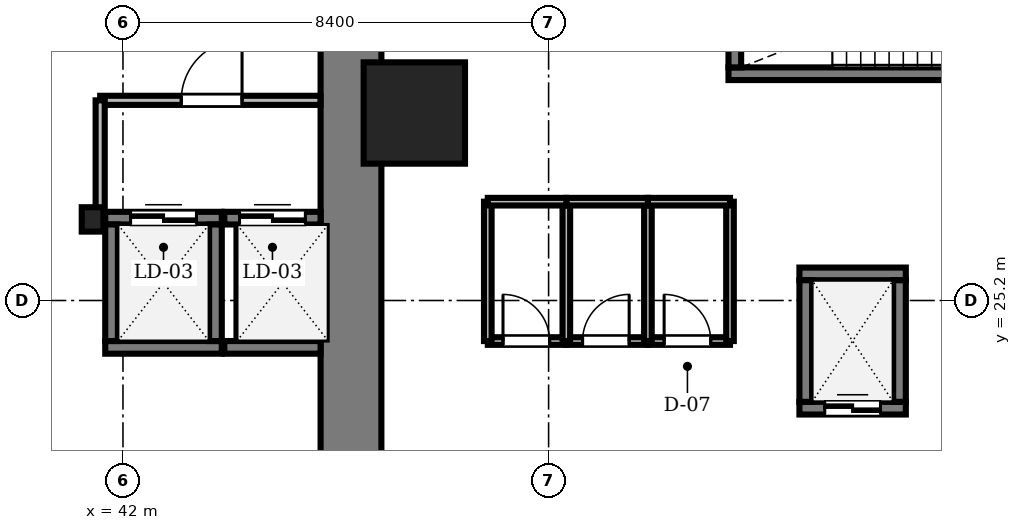
"""IFC4 building model, lengths in metres.
Left out: names, types, materials, properties, quantities, classifications, styles, units other than length and angle.
Written with IfcOpenShell. Run it as: python <this file> out.ifc"""

import sys

from ifc_helpers import new_model, si_unit, direction, frame, frame_2d, origin, origin_2d, place, context, subcontext, project, spatial, rectangle, i_section, extrude, source, transform, mapped, element, fill, save


model = new_model("IFC4")
c1 = context("Model", 3, precision=1e-05, world=origin(), true_north=direction((0.0, 1.0)))
c2 = subcontext(c1, "Body", "Model", "MODEL_VIEW")
j1 = project(units=[si_unit("LENGTHUNIT", "METRE"), si_unit("PLANEANGLEUNIT", "RADIAN")], contexts=[c1])
p1 = place(None, origin())
s1 = spatial("IfcSite", under=j1, at=p1, CompositionType="ELEMENT")
p2 = place(p1, origin())
s2 = spatial("IfcBuilding", under=s1, at=p2, CompositionType="ELEMENT")
p3 = place(p2, origin())
s3 = spatial("IfcBuildingStorey", under=s2, at=p3, CompositionType="ELEMENT", Elevation=0.0)
m1 = source(origin(), c2, "Body", "SweptSolid", [
    extrude(rectangle(XDim=13.15, YDim=1.2, at=frame_2d((6.575, 0.0))), origin(), (0.0, 0.0, 1.0), 5.68),
])
p4 = place(p3, frame((46.5, 17.5, 0.0), z_axis=(0.0, 0.0, 1.0), x_axis=(0.0, 1.0, 0.0)))
e1 = element("IfcWall", 1, at=p4, inside=s3, PredefinedType="SHEAR", context=c2, shape_type="MappedRepresentation", body=[
    mapped(m1, transform((0.0, 0.0, 0.0), scale=1.0)),
])
m2 = source(origin(), c2, "Body", "SweptSolid", [
    extrude(i_section(OverallWidth=0.428, OverallDepth=0.481, WebThickness=0.04, FlangeThickness=0.063, FilletRadius=0.015, at=origin_2d()), origin(), (0.0, 0.0, 1.0), 5.68),
])
p5 = place(p3, frame((41.4, 26.8, 0.0), z_axis=(0.0, 0.0, 1.0), x_axis=(1.0, 0.0, 0.0)))
e2 = element("IfcColumn", 2, at=p5, inside=s3, PredefinedType="COLUMN", context=c2, shape_type="MappedRepresentation", body=[
    mapped(m2, transform((0.0, 0.0, 0.0), scale=1.0)),
])
m3 = source(origin(), c2, "Body", "SweptSolid", [
    extrude(rectangle(XDim=2.0, YDim=2.0, at=origin_2d()), origin(), (0.0, 0.0, 1.0), 5.68),
])
p6 = place(p3, frame((47.75, 28.9, 0.0), z_axis=(0.0, 0.0, 1.0), x_axis=(1.0, 0.0, 0.0)))
e3 = element("IfcColumn", 3, at=p6, inside=s3, PredefinedType="COLUMN", context=c2, shape_type="MappedRepresentation", body=[
    mapped(m3, transform((0.0, 0.0, 0.0), scale=1.0)),
])
m4 = source(origin(), c2, "Body", "SweptSolid", [
    extrude(rectangle(XDim=9.9, YDim=0.25, at=frame_2d((4.95, 0.0))), origin(), (0.0, 0.0, 1.0), 5.8),
])
p7 = place(p3, frame((53.95, 29.675, 0.0), z_axis=(0.0, 0.0, 1.0), x_axis=(1.0, 0.0, 0.0)))
e4 = element("IfcWall", 4, at=p7, inside=s3, PredefinedType="SOLIDWALL", context=c2, shape_type="MappedRepresentation", body=[
    mapped(m4, transform((0.0, 0.0, 0.0), scale=1.0)),
])
m5 = source(origin(), c2, "Body", "SweptSolid", [
    extrude(rectangle(XDim=3.75, YDim=0.25, at=frame_2d((1.875, 0.0))), origin(), (0.0, 0.0, 1.0), 5.8),
])
p8 = place(p3, frame((54.075, 29.8, 0.0), z_axis=(0.0, 0.0, 1.0), x_axis=(0.0, 1.0, 0.0)))
e5 = element("IfcWall", 5, at=p8, inside=s3, PredefinedType="SOLIDWALL", context=c2, shape_type="MappedRepresentation", body=[
    mapped(m5, transform((0.0, 0.0, 0.0), scale=1.0)),
])
m6 = source(origin(), c2, "Body", "SweptSolid", [
    extrude(rectangle(XDim=1.1, YDim=2.2, at=frame_2d((0.55, 1.1))), frame((0.0, 0.135, 0.0), z_axis=(0.0, -1.0, 0.0), x_axis=(1.0, 0.0, 0.0)), (0.0, 0.0, 1.0), 0.27),
])
p9 = place(p8, frame((2.3, 0.0, 0.0)))
e6 = element("IfcOpeningElement", 6, at=p9, cuts=e5, PredefinedType="OPENING", context=c2, shape_type="MappedRepresentation", body=[
    mapped(m6, transform((0.0, 0.0, 0.0), scale=1.0)),
])
m7 = source(origin(), c2, "Body", "SweptSolid", [
    extrude(rectangle(XDim=2.1, YDim=0.25, at=frame_2d((1.05, 0.0))), origin(), (0.0, 0.0, 1.0), 5.68),
])
p10 = place(p3, frame((55.35, 23.075, 0.0), z_axis=(0.0, 0.0, 1.0), x_axis=(1.0, 0.0, 0.0)))
e7 = element("IfcWall", 7, at=p10, inside=s3, PredefinedType="SOLIDWALL", context=c2, shape_type="MappedRepresentation", body=[
    mapped(m7, transform((0.0, 0.0, 0.0), scale=1.0)),
])
p11 = place(p10, frame((0.5, 0.0, 0.0)))
e8 = element("IfcOpeningElement", 8, at=p11, cuts=e7, PredefinedType="OPENING", context=c2, shape_type="MappedRepresentation", body=[
    mapped(m6, transform((0.0, 0.0, 0.0), scale=1.0)),
])
p12 = place(p3, frame((55.35, 25.725, 0.0), z_axis=(0.0, 0.0, 1.0), x_axis=(1.0, 0.0, 0.0)))
e9 = element("IfcWall", 9, at=p12, inside=s3, PredefinedType="SOLIDWALL", context=c2, shape_type="MappedRepresentation", body=[
    mapped(m7, transform((0.0, 0.0, 0.0), scale=1.0)),
])
m8 = source(origin(), c2, "Body", "SweptSolid", [
    extrude(rectangle(XDim=2.4, YDim=0.25, at=frame_2d((1.2, 0.0))), origin(), (0.0, 0.0, 1.0), 5.68),
])
for number, where, z_axis, x_axis in (
    (10, (55.475, 23.2, 0.0), (0.0, 0.0, 1.0), (0.0, 1.0, 0.0)),
    (11, (57.325, 23.2, 0.0), (0.0, 0.0, 1.0), (0.0, 1.0, 0.0)),
):
    element("IfcWall", number, at=place(p3, frame(where, z_axis=z_axis, x_axis=x_axis)), inside=s3, PredefinedType="SOLIDWALL", context=c2, shape_type="MappedRepresentation", body=[
        mapped(m8, transform((0.0, 0.0, 0.0), scale=1.0)),
    ])
m9 = source(origin(), c2, "Body", "SweptSolid", [
    extrude(rectangle(XDim=2.3, YDim=0.25, at=frame_2d((1.15, 0.0))), origin(), (0.0, 0.0, 1.0), 5.68),
])
p13 = place(p3, frame((41.65, 24.275, 0.0), z_axis=(0.0, 0.0, 1.0), x_axis=(1.0, 0.0, 0.0)))
e12 = element("IfcWall", 12, at=p13, inside=s3, PredefinedType="SOLIDWALL", context=c2, shape_type="MappedRepresentation", body=[
    mapped(m9, transform((0.0, 0.0, 0.0), scale=1.0)),
])
p14 = place(p3, frame((41.65, 26.825, 0.0), z_axis=(0.0, 0.0, 1.0), x_axis=(1.0, 0.0, 0.0)))
e13 = element("IfcWall", 13, at=p14, inside=s3, PredefinedType="SOLIDWALL", context=c2, shape_type="MappedRepresentation", body=[
    mapped(m9, transform((0.0, 0.0, 0.0), scale=1.0)),
])
m10 = source(origin(), c2, "Body", "SweptSolid", [
    extrude(rectangle(XDim=1.3, YDim=2.3, at=frame_2d((0.65, 1.15))), frame((0.0, 0.135, 0.0), z_axis=(0.0, -1.0, 0.0), x_axis=(1.0, 0.0, 0.0)), (0.0, 0.0, 1.0), 0.27),
])
p15 = place(p14, frame((0.5, 0.0, 0.0)))
e14 = element("IfcOpeningElement", 14, at=p15, cuts=e13, PredefinedType="OPENING", context=c2, shape_type="MappedRepresentation", body=[
    mapped(m10, transform((0.0, 0.0, 0.0), scale=1.0)),
])
for number, where, z_axis, x_axis in (
    (15, (41.775, 24.4, 0.0), (0.0, 0.0, 1.0), (0.0, 1.0, 0.0)),
    (16, (43.825, 24.4, 0.0), (0.0, 0.0, 1.0), (0.0, 1.0, 0.0)),
):
    element("IfcWall", number, at=place(p3, frame(where, z_axis=z_axis, x_axis=x_axis)), inside=s3, PredefinedType="SOLIDWALL", context=c2, shape_type="MappedRepresentation", body=[
        mapped(m9, transform((0.0, 0.0, 0.0), scale=1.0)),
    ])
m11 = source(origin(), c2, "Body", "SweptSolid", [
    extrude(rectangle(XDim=1.9, YDim=0.25, at=frame_2d((0.95, 0.0))), origin(), (0.0, 0.0, 1.0), 5.68),
])
p16 = place(p3, frame((44.0, 24.275, 0.0), z_axis=(0.0, 0.0, 1.0), x_axis=(1.0, 0.0, 0.0)))
e17 = element("IfcWall", 17, at=p16, inside=s3, PredefinedType="SOLIDWALL", context=c2, shape_type="MappedRepresentation", body=[
    mapped(m11, transform((0.0, 0.0, 0.0), scale=1.0)),
])
p17 = place(p3, frame((44.0, 26.825, 0.0), z_axis=(0.0, 0.0, 1.0), x_axis=(1.0, 0.0, 0.0)))
e18 = element("IfcWall", 18, at=p17, inside=s3, PredefinedType="SOLIDWALL", context=c2, shape_type="MappedRepresentation", body=[
    mapped(m11, transform((0.0, 0.0, 0.0), scale=1.0)),
])
p18 = place(p17, frame((0.3, 0.0, 0.0)))
e19 = element("IfcOpeningElement", 19, at=p18, cuts=e18, PredefinedType="OPENING", context=c2, shape_type="MappedRepresentation", body=[
    mapped(m10, transform((0.0, 0.0, 0.0), scale=1.0)),
])
m12 = source(origin(), c2, "Body", "SweptSolid", [
    extrude(rectangle(XDim=4.348, YDim=0.18, at=frame_2d((2.174, 0.0))), origin(), (0.0, 0.0, 1.0), 5.68),
])
p19 = place(p3, frame((41.55, 29.15, 0.0), z_axis=(0.0, 0.0, 1.0), x_axis=(1.0, 0.0, 0.0)))
e20 = element("IfcWall", 20, at=p19, inside=s3, PredefinedType="PARTITIONING", context=c2, shape_type="MappedRepresentation", body=[
    mapped(m12, transform((0.0, 0.0, 0.0), scale=1.0)),
])
m13 = source(origin(), c2, "Body", "SweptSolid", [
    extrude(rectangle(XDim=1.2, YDim=2.2, at=frame_2d((0.6, 1.1))), frame((0.0, 0.1, 0.0), z_axis=(0.0, -1.0, 0.0), x_axis=(1.0, 0.0, 0.0)), (0.0, 0.0, 1.0), 0.2),
])
p20 = place(p19, frame((1.6, 0.0, 0.0)))
e21 = element("IfcOpeningElement", 21, at=p20, cuts=e20, PredefinedType="OPENING", context=c2, shape_type="MappedRepresentation", body=[
    mapped(m13, transform((0.0, 0.0, 0.0), scale=1.0)),
])
m14 = source(origin(), c2, "Body", "SweptSolid", [
    extrude(rectangle(XDim=1.62, YDim=0.15, at=frame_2d((0.81, 0.0))), origin(), (0.0, 0.0, 1.0), 5.68),
])
p21 = place(p3, frame((52.36, 24.4, 0.0), z_axis=(0.0, 0.0, 1.0), x_axis=(1.0, 0.0, 0.0)))
e22 = element("IfcWall", 22, at=p21, inside=s3, PredefinedType="PARTITIONING", context=c2, shape_type="MappedRepresentation", body=[
    mapped(m14, transform((0.0, 0.0, 0.0), scale=1.0)),
])
m15 = source(origin(), c2, "Body", "SweptSolid", [
    extrude(rectangle(XDim=0.92, YDim=2.1, at=frame_2d((0.46, 1.05))), frame((0.0, 0.085, 0.0), z_axis=(0.0, -1.0, 0.0), x_axis=(1.0, 0.0, 0.0)), (0.0, 0.0, 1.0), 0.17),
])
p22 = place(p21, frame((0.32, 0.0, 0.0)))
e23 = element("IfcOpeningElement", 23, at=p22, cuts=e22, PredefinedType="OPENING", context=c2, shape_type="MappedRepresentation", body=[
    mapped(m15, transform((0.0, 0.0, 0.0), scale=1.0)),
])
m16 = source(origin(), c2, "Body", "SweptSolid", [
    extrude(rectangle(XDim=1.61, YDim=0.15, at=frame_2d((0.805, 0.0))), origin(), (0.0, 0.0, 1.0), 5.68),
])
p23 = place(p3, frame((50.75, 24.4, 0.0), z_axis=(0.0, 0.0, 1.0), x_axis=(1.0, 0.0, 0.0)))
e24 = element("IfcWall", 24, at=p23, inside=s3, PredefinedType="PARTITIONING", context=c2, shape_type="MappedRepresentation", body=[
    mapped(m16, transform((0.0, 0.0, 0.0), scale=1.0)),
])
p24 = place(p23, frame((0.32, 0.0, 0.0)))
e25 = element("IfcOpeningElement", 25, at=p24, cuts=e24, PredefinedType="OPENING", context=c2, shape_type="MappedRepresentation", body=[
    mapped(m15, transform((0.0, 0.0, 0.0), scale=1.0)),
])
m17 = source(origin(), c2, "Body", "SweptSolid", [
    extrude(rectangle(XDim=1.55, YDim=0.15, at=frame_2d((0.775, 0.0))), origin(), (0.0, 0.0, 1.0), 5.68),
])
p25 = place(p3, frame((49.2, 24.4, 0.0), z_axis=(0.0, 0.0, 1.0), x_axis=(1.0, 0.0, 0.0)))
e26 = element("IfcWall", 26, at=p25, inside=s3, PredefinedType="PARTITIONING", context=c2, shape_type="MappedRepresentation", body=[
    mapped(m17, transform((0.0, 0.0, 0.0), scale=1.0)),
])
p26 = place(p25, frame((0.3, 0.0, 0.0)))
e27 = element("IfcOpeningElement", 27, at=p26, cuts=e26, PredefinedType="OPENING", context=c2, shape_type="MappedRepresentation", body=[
    mapped(m15, transform((0.0, 0.0, 0.0), scale=1.0)),
])
m18 = source(origin(), c2, "Body", "SweptSolid", [
    extrude(rectangle(XDim=2.75, YDim=0.15, at=frame_2d((1.375, 0.0))), origin(), (0.0, 0.0, 1.0), 5.68),
])
for number, where, z_axis, x_axis in (
    (28, (49.2, 24.4, 0.0), (0.0, 0.0, 1.0), (0.0, 1.0, 0.0)),
    (29, (50.75, 24.4, 0.0), (0.0, 0.0, 1.0), (0.0, 1.0, 0.0)),
    (30, (52.36, 24.4, 0.0), (0.0, 0.0, 1.0), (0.0, 1.0, 0.0)),
    (31, (53.98, 24.4, 0.0), (0.0, 0.0, 1.0), (0.0, 1.0, 0.0)),
):
    element("IfcWall", number, at=place(p3, frame(where, z_axis=z_axis, x_axis=x_axis)), inside=s3, PredefinedType="PARTITIONING", context=c2, shape_type="MappedRepresentation", body=[
        mapped(m18, transform((0.0, 0.0, 0.0), scale=1.0)),
    ])
m19 = source(origin(), c2, "Body", "SweptSolid", [
    extrude(rectangle(XDim=2.35, YDim=0.18, at=frame_2d((1.175, 0.0))), origin(), (0.0, 0.0, 1.0), 5.68),
])
p27 = place(p3, frame((41.55, 26.8, 0.0), z_axis=(0.0, 0.0, 1.0), x_axis=(0.0, 1.0, 0.0)))
e32 = element("IfcWall", 32, at=p27, inside=s3, PredefinedType="PARTITIONING", context=c2, shape_type="MappedRepresentation", body=[
    mapped(m19, transform((0.0, 0.0, 0.0), scale=1.0)),
])
p28 = place(p3, frame((52.36, 27.15, 0.0), z_axis=(0.0, 0.0, 1.0), x_axis=(1.0, 0.0, 0.0)))
e33 = element("IfcWall", 33, at=p28, inside=s3, PredefinedType="PARTITIONING", context=c2, shape_type="MappedRepresentation", body=[
    mapped(m14, transform((0.0, 0.0, 0.0), scale=1.0)),
])
p29 = place(p3, frame((50.75, 27.15, 0.0), z_axis=(0.0, 0.0, 1.0), x_axis=(1.0, 0.0, 0.0)))
e34 = element("IfcWall", 34, at=p29, inside=s3, PredefinedType="PARTITIONING", context=c2, shape_type="MappedRepresentation", body=[
    mapped(m16, transform((0.0, 0.0, 0.0), scale=1.0)),
])
p30 = place(p3, frame((49.2, 27.15, 0.0), z_axis=(0.0, 0.0, 1.0), x_axis=(1.0, 0.0, 0.0)))
e35 = element("IfcWall", 35, at=p30, inside=s3, PredefinedType="PARTITIONING", context=c2, shape_type="MappedRepresentation", body=[
    mapped(m17, transform((0.0, 0.0, 0.0), scale=1.0)),
])
m20 = source(origin(), c2, "Body", "SweptSolid", [
    extrude(rectangle(XDim=1.1, YDim=2.2, at=frame_2d((0.55, 1.1))), frame((0.0, 0.025, 0.0), z_axis=(0.0, -1.0, 0.0), x_axis=(1.0, 0.0, 0.0)), (0.0, 0.0, 1.0), 0.05),
])
p31 = place(p11, origin())
e36 = element("IfcDoor", 36, at=p31, inside=s3, OperationType="DOUBLE_DOOR_SLIDING", PredefinedType="DOOR", context=c2, shape_type="MappedRepresentation", body=[
    mapped(m20, transform((0.0, 0.0, 0.0), scale=1.0)),
])
fill(e8, e36)
m21 = source(origin(), c2, "Body", "SweptSolid", [
    extrude(rectangle(XDim=1.3, YDim=2.3, at=frame_2d((0.65, 1.15))), frame((0.0, 0.025, 0.0), z_axis=(0.0, -1.0, 0.0), x_axis=(1.0, 0.0, 0.0)), (0.0, 0.0, 1.0), 0.05),
])
p32 = place(p15, origin())
e37 = element("IfcDoor", 37, at=p32, inside=s3, OperationType="DOUBLE_DOOR_SLIDING", PredefinedType="DOOR", context=c2, shape_type="MappedRepresentation", body=[
    mapped(m21, transform((0.0, 0.0, 0.0), scale=1.0)),
])
fill(e14, e37)
p33 = place(p18, origin())
e38 = element("IfcDoor", 38, at=p33, inside=s3, OperationType="DOUBLE_DOOR_SLIDING", PredefinedType="DOOR", context=c2, shape_type="MappedRepresentation", body=[
    mapped(m21, transform((0.0, 0.0, 0.0), scale=1.0)),
])
fill(e19, e38)
m22 = source(origin(), c2, "Body", "SweptSolid", [
    extrude(rectangle(XDim=1.2, YDim=2.2, at=frame_2d((0.6, 1.1))), frame((0.0, 0.025, 0.0), z_axis=(0.0, -1.0, 0.0), x_axis=(1.0, 0.0, 0.0)), (0.0, 0.0, 1.0), 0.05),
])
p34 = place(p20, origin())
e39 = element("IfcDoor", 39, at=p34, inside=s3, OperationType="SINGLE_SWING_RIGHT", PredefinedType="DOOR", context=c2, shape_type="MappedRepresentation", body=[
    mapped(m22, transform((0.0, 0.0, 0.0), scale=1.0)),
])
fill(e21, e39)
m23 = source(origin(), c2, "Body", "SweptSolid", [
    extrude(rectangle(XDim=0.92, YDim=2.1, at=frame_2d((0.46, 1.05))), frame((0.0, 0.025, 0.0), z_axis=(0.0, -1.0, 0.0), x_axis=(1.0, 0.0, 0.0)), (0.0, 0.0, 1.0), 0.05),
])
p35 = place(p22, origin())
e40 = element("IfcDoor", 40, at=p35, inside=s3, OperationType="SINGLE_SWING_LEFT", PredefinedType="DOOR", context=c2, shape_type="MappedRepresentation", body=[
    mapped(m23, transform((0.0, 0.0, 0.0), scale=1.0)),
])
fill(e23, e40)
p36 = place(p24, origin())
e41 = element("IfcDoor", 41, at=p36, inside=s3, OperationType="SINGLE_SWING_RIGHT", PredefinedType="DOOR", context=c2, shape_type="MappedRepresentation", body=[
    mapped(m23, transform((0.0, 0.0, 0.0), scale=1.0)),
])
fill(e25, e41)
p37 = place(p26, origin())
e42 = element("IfcDoor", 42, at=p37, inside=s3, OperationType="SINGLE_SWING_LEFT", PredefinedType="DOOR", context=c2, shape_type="MappedRepresentation", body=[
    mapped(m23, transform((0.0, 0.0, 0.0), scale=1.0)),
])
fill(e27, e42)
save(model, sys.argv[1])
